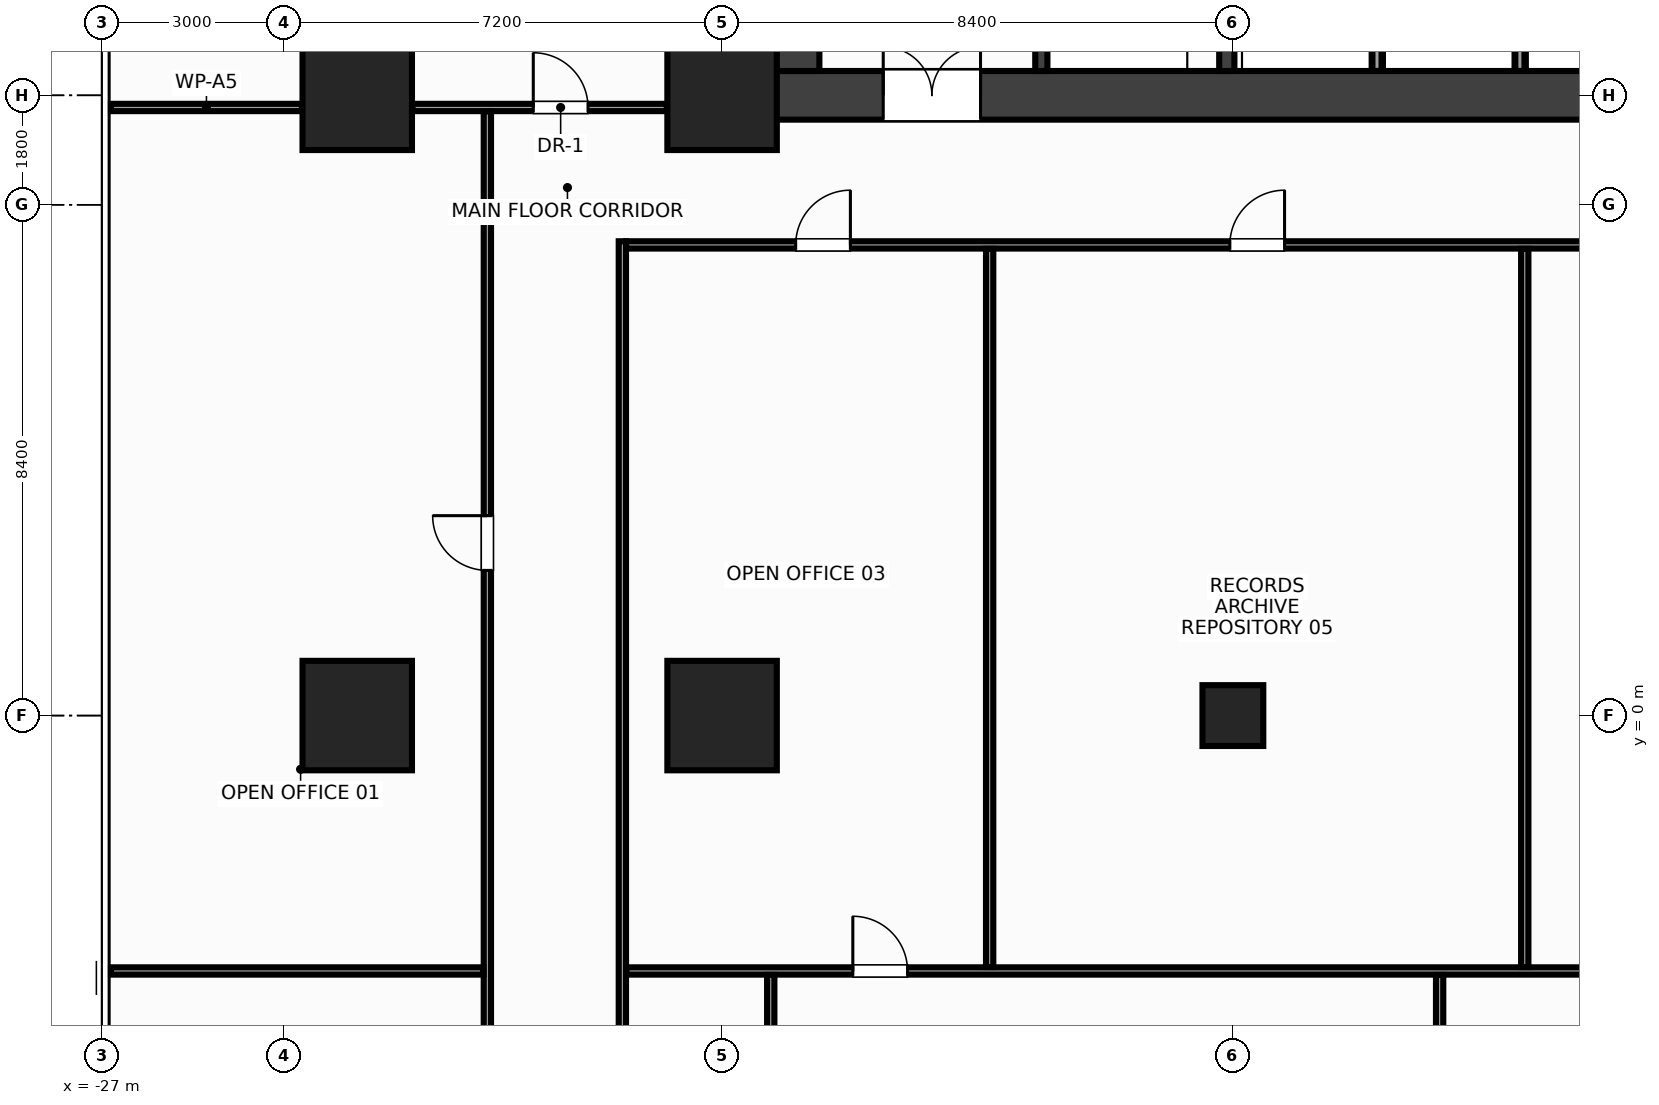
"""IFC4 building model, lengths in metres.
Left out: names, types, materials, properties, quantities, classifications, styles, units other than length and angle.
Written with IfcOpenShell. Run it as: python <this file> out.ifc"""

import sys

from ifc_helpers import new_model, si_unit, direction, frame, frame_2d, origin, origin_2d, place, context, subcontext, project, spatial, rectangle, hollow_rectangle, extrude, source, transform, mapped, element, fill, save


model = new_model("IFC4")
c1 = context("Model", 3, precision=1e-05, world=origin(), true_north=direction((0.0, 1.0)))
c2 = subcontext(c1, "Body", "Model", "MODEL_VIEW")
j1 = project(units=[si_unit("LENGTHUNIT", "METRE"), si_unit("PLANEANGLEUNIT", "RADIAN")], contexts=[c1])
p1 = place(None, origin())
s1 = spatial("IfcSite", under=j1, at=p1, CompositionType="ELEMENT")
p2 = place(p1, origin())
s2 = spatial("IfcBuilding", under=s1, at=p2, CompositionType="ELEMENT")
p3 = place(p2, frame((0.0, 0.0, 23.6)))
s3 = spatial("IfcBuildingStorey", under=s2, at=p3, CompositionType="ELEMENT", Elevation=23.6)
m1 = source(origin(), c2, "Body", "SweptSolid", [
    extrude(rectangle(XDim=32.0, YDim=0.8, at=frame_2d((16.0, 0.0))), origin(), (0.0, 0.0, 1.0), 3.6),
])
p4 = place(p3, frame((-16.0, 10.2, 0.0), z_axis=(0.0, 0.0, 1.0), x_axis=(1.0, 0.0, 0.0)))
e1 = element("IfcWall", 1, at=p4, inside=s3, PredefinedType="SHEAR", context=c2, shape_type="MappedRepresentation", body=[
    mapped(m1, transform((0.0, 0.0, 0.0), x_axis=(1.0, 0.0, 0.0), y_axis=(0.0, 1.0, 0.0), z_axis=(0.0, 0.0, 1.0), scale=1.0)),
])
p5 = place(p4, frame((1.85, 0.0, 0.0)))
e2 = element("IfcOpeningElement", 2, at=p5, cuts=e1, PredefinedType="OPENING", context=c2, shape_type="SweptSolid", body=[
    extrude(rectangle(XDim=1.6, YDim=2.15, at=frame_2d((0.8, 1.075))), frame((0.0, 0.412, 0.0), z_axis=(0.0, -1.0, 0.0), x_axis=(1.0, 0.0, 0.0)), (0.0, 0.0, 1.0), 0.824),
])
p6 = place(p4, frame((28.55, 0.0, 0.0)))
e3 = element("IfcOpeningElement", 3, at=p6, cuts=e1, PredefinedType="OPENING", context=c2, shape_type="SweptSolid", body=[
    extrude(rectangle(XDim=1.6, YDim=2.15, at=frame_2d((0.8, 1.075))), frame((0.0, 0.412, 0.0), z_axis=(0.0, -1.0, 0.0), x_axis=(1.0, 0.0, 0.0)), (0.0, 0.0, 1.0), 0.824),
])
p7 = place(p4, frame((15.25, 0.0, 0.0)))
e4 = element("IfcOpeningElement", 4, at=p7, cuts=e1, PredefinedType="OPENING", context=c2, shape_type="SweptSolid", body=[
    extrude(rectangle(XDim=1.5, YDim=2.2, at=frame_2d((0.75, 1.1))), frame((0.0, 0.412, 0.0), z_axis=(0.0, -1.0, 0.0), x_axis=(1.0, 0.0, 0.0)), (0.0, 0.0, 1.0), 0.824),
])
m2 = source(origin(), c2, "Body", "SweptSolid", [
    extrude(rectangle(XDim=12.8, YDim=0.8, at=frame_2d((6.4, 0.0))), origin(), (0.0, 0.0, 1.0), 3.6),
])
p8 = place(p3, frame((-15.6, 10.6, 0.0), z_axis=(0.0, 0.0, 1.0), x_axis=(0.0, 1.0, 0.0)))
e5 = element("IfcWall", 5, at=p8, inside=s3, PredefinedType="SHEAR", context=c2, shape_type="MappedRepresentation", body=[
    mapped(m2, transform((0.0, 0.0, 0.0), x_axis=(1.0, 0.0, 0.0), y_axis=(0.0, 1.0, 0.0), z_axis=(0.0, 0.0, 1.0), scale=1.0)),
])
m3 = source(origin(), c2, "Body", "SweptSolid", [
    extrude(rectangle(XDim=12.8, YDim=0.25, at=frame_2d((6.4, 0.0))), origin(), (0.0, 0.0, 1.0), 3.6),
])
p9 = place(p3, frame((-8.5, 10.6, 0.0), z_axis=(0.0, 0.0, 1.0), x_axis=(0.0, 1.0, 0.0)))
e6 = element("IfcWall", 6, at=p9, inside=s3, PredefinedType="SHEAR", context=c2, shape_type="MappedRepresentation", body=[
    mapped(m3, transform((0.0, 0.0, 0.0), x_axis=(1.0, 0.0, 0.0), y_axis=(0.0, 1.0, 0.0), z_axis=(0.0, 0.0, 1.0), scale=1.0)),
])
p10 = place(p9, frame((5.9, 0.0, 0.0)))
e7 = element("IfcOpeningElement", 7, at=p10, cuts=e6, PredefinedType="OPENING", context=c2, shape_type="SweptSolid", body=[
    extrude(rectangle(XDim=0.95, YDim=2.15, at=frame_2d((0.475, 1.075))), frame((0.0, 0.137, 0.0), z_axis=(0.0, -1.0, 0.0), x_axis=(1.0, 0.0, 0.0)), (0.0, 0.0, 1.0), 0.274),
])
m4 = source(origin(), c2, "Body", "SweptSolid", [
    extrude(rectangle(XDim=3.05, YDim=0.2, at=frame_2d((1.525, 0.0))), origin(), (0.0, 0.0, 1.0), 3.6),
])
p11 = place(p3, frame((-11.55, 10.6, 0.0), z_axis=(0.0, 0.0, 1.0), x_axis=(0.0, 1.0, 0.0)))
e8 = element("IfcWall", 8, at=p11, inside=s3, PredefinedType="SHEAR", context=c2, shape_type="MappedRepresentation", body=[
    mapped(m4, transform((0.0, 0.0, 0.0), x_axis=(1.0, 0.0, 0.0), y_axis=(0.0, 1.0, 0.0), z_axis=(0.0, 0.0, 1.0), scale=1.0)),
])
p12 = place(p11, frame((0.9, 0.0, 0.0)))
e9 = element("IfcOpeningElement", 9, at=p12, cuts=e8, PredefinedType="OPENING", context=c2, shape_type="SweptSolid", body=[
    extrude(rectangle(XDim=1.1, YDim=2.15, at=frame_2d((0.55, 1.075))), frame((0.0, 0.112, 0.0), z_axis=(0.0, -1.0, 0.0), x_axis=(1.0, 0.0, 0.0)), (0.0, 0.0, 1.0), 0.224),
])
m5 = source(origin(), c2, "Body", "SweptSolid", [
    extrude(rectangle(XDim=1.8, YDim=1.8, at=origin_2d()), origin(), (0.0, 0.0, 1.0), 3.6),
])
for number, where, z_axis, x_axis in (
    (10, (-16.8, 0.0, 0.0), (0.0, 0.0, 1.0), (1.0, 0.0, 0.0)),
    (11, (-16.8, 10.2, 0.0), (0.0, 0.0, 1.0), (1.0, 0.0, 0.0)),
    (12, (-22.8, 0.0, 0.0), (0.0, 0.0, 1.0), (1.0, 0.0, 0.0)),
    (13, (-22.8, 10.2, 0.0), (0.0, 0.0, 1.0), (1.0, 0.0, 0.0)),
):
    element("IfcColumn", number, at=place(p3, frame(where, z_axis=z_axis, x_axis=x_axis)), inside=s3, PredefinedType="COLUMN", context=c2, shape_type="MappedRepresentation", body=[
        mapped(m5, transform((0.0, 0.0, 0.0), x_axis=(1.0, 0.0, 0.0), y_axis=(0.0, 1.0, 0.0), z_axis=(0.0, 0.0, 1.0), scale=1.0)),
    ])
m6 = source(origin(), c2, "Body", "SweptSolid", [
    extrude(hollow_rectangle(XDim=1.0, YDim=1.0, WallThickness=0.045, at=origin_2d()), origin(), (0.0, 0.0, 1.0), 3.6),
])
p13 = place(p3, frame((-8.4, 0.0, 0.0), z_axis=(0.0, 0.0, 1.0), x_axis=(1.0, 0.0, 0.0)))
e14 = element("IfcColumn", 14, at=p13, inside=s3, PredefinedType="COLUMN", context=c2, shape_type="MappedRepresentation", body=[
    mapped(m6, transform((0.0, 0.0, 0.0), x_axis=(1.0, 0.0, 0.0), y_axis=(0.0, 1.0, 0.0), z_axis=(0.0, 0.0, 1.0), scale=1.0)),
])
m7 = source(origin(), c2, "Body", "SweptSolid", [
    extrude(rectangle(XDim=3.34, YDim=0.15, at=frame_2d((1.67, 0.0))), origin(), (0.0, 0.0, 1.0), 3.36),
])
for number, where, z_axis, x_axis in (
    (15, (-6.03, 10.6, 0.0), (0.0, 0.0, 1.0), (0.0, 1.0, 0.0)),
    (16, (-3.68, 10.6, 0.0), (0.0, 0.0, 1.0), (0.0, 1.0, 0.0)),
):
    element("IfcWall", number, at=place(p3, frame(where, z_axis=z_axis, x_axis=x_axis)), inside=s3, PredefinedType="PARTITIONING", context=c2, shape_type="MappedRepresentation", body=[
        mapped(m7, transform((0.0, 0.0, 0.0), x_axis=(1.0, 0.0, 0.0), y_axis=(0.0, 1.0, 0.0), z_axis=(0.0, 0.0, 1.0), scale=1.0)),
    ])
m8 = source(origin(), c2, "Body", "SweptSolid", [
    extrude(rectangle(XDim=3.14, YDim=0.12, at=frame_2d((1.57, 0.0))), origin(), (0.0, 0.0, 1.0), 2.435),
])
p14 = place(p3, frame((-26.85, 10.0, 0.0), z_axis=(0.0, 0.0, 1.0), x_axis=(1.0, 0.0, 0.0)))
e17 = element("IfcWall", 17, at=p14, inside=s3, PredefinedType="PARTITIONING", context=c2, shape_type="MappedRepresentation", body=[
    mapped(m8, transform((0.0, 0.0, 0.0), x_axis=(1.0, 0.0, 0.0), y_axis=(0.0, 1.0, 0.0), z_axis=(0.0, 0.0, 1.0), scale=1.0)),
])
m9 = source(origin(), c2, "Body", "SweptSolid", [
    extrude(rectangle(XDim=4.18, YDim=0.12, at=frame_2d((2.09, 0.0))), origin(), (0.0, 0.0, 1.0), 2.745),
])
p15 = place(p3, frame((-21.89, 10.0, 0.0), z_axis=(0.0, 0.0, 1.0), x_axis=(1.0, 0.0, 0.0)))
e18 = element("IfcWall", 18, at=p15, inside=s3, PredefinedType="PARTITIONING", context=c2, shape_type="MappedRepresentation", body=[
    mapped(m9, transform((0.0, 0.0, 0.0), x_axis=(1.0, 0.0, 0.0), y_axis=(0.0, 1.0, 0.0), z_axis=(0.0, 0.0, 1.0), scale=1.0)),
])
p16 = place(p15, frame((1.985, 0.0, 0.0)))
e19 = element("IfcOpeningElement", 19, at=p16, cuts=e18, PredefinedType="OPENING", context=c2, shape_type="SweptSolid", body=[
    extrude(rectangle(XDim=0.9, YDim=2.15, at=frame_2d((0.45, 1.075))), frame((0.0, 0.072, 0.0), z_axis=(0.0, -1.0, 0.0), x_axis=(1.0, 0.0, 0.0)), (0.0, 0.0, 1.0), 0.144),
])
m10 = source(origin(), c2, "Body", "SweptSolid", [
    extrude(rectangle(XDim=36.76, YDim=0.12, at=frame_2d((18.38, 0.0))), origin(), (0.0, 0.0, 1.0), 2.745),
])
p17 = place(p3, frame((-18.38, 7.74, 0.0), z_axis=(0.0, 0.0, 1.0), x_axis=(1.0, 0.0, 0.0)))
e20 = element("IfcWall", 20, at=p17, inside=s3, PredefinedType="PARTITIONING", context=c2, shape_type="MappedRepresentation", body=[
    mapped(m10, transform((0.0, 0.0, 0.0), x_axis=(1.0, 0.0, 0.0), y_axis=(0.0, 1.0, 0.0), z_axis=(0.0, 0.0, 1.0), scale=1.0)),
])
p18 = place(p17, frame((2.79, 0.0, 0.0)))
e21 = element("IfcOpeningElement", 21, at=p18, cuts=e20, PredefinedType="OPENING", context=c2, shape_type="SweptSolid", body=[
    extrude(rectangle(XDim=0.9, YDim=2.15, at=frame_2d((0.45, 1.075))), frame((0.0, 0.072, 0.0), z_axis=(0.0, -1.0, 0.0), x_axis=(1.0, 0.0, 0.0)), (0.0, 0.0, 1.0), 0.144),
])
p19 = place(p17, frame((32.99, 0.0, 0.0)))
e22 = element("IfcOpeningElement", 22, at=p19, cuts=e20, PredefinedType="OPENING", context=c2, shape_type="SweptSolid", body=[
    extrude(rectangle(XDim=0.9, YDim=2.15, at=frame_2d((0.45, 1.075))), frame((0.0, 0.072, 0.0), z_axis=(0.0, -1.0, 0.0), x_axis=(1.0, 0.0, 0.0)), (0.0, 0.0, 1.0), 0.144),
])
p20 = place(p17, frame((9.93, 0.0, 0.0)))
e23 = element("IfcOpeningElement", 23, at=p20, cuts=e20, PredefinedType="OPENING", context=c2, shape_type="SweptSolid", body=[
    extrude(rectangle(XDim=0.9, YDim=2.15, at=frame_2d((0.45, 1.075))), frame((0.0, 0.072, 0.0), z_axis=(0.0, -1.0, 0.0), x_axis=(1.0, 0.0, 0.0)), (0.0, 0.0, 1.0), 0.144),
])
p21 = place(p17, frame((18.23, 0.0, 0.0)))
e24 = element("IfcOpeningElement", 24, at=p21, cuts=e20, PredefinedType="OPENING", context=c2, shape_type="SweptSolid", body=[
    extrude(rectangle(XDim=0.9, YDim=2.15, at=frame_2d((0.45, 1.075))), frame((0.0, 0.072, 0.0), z_axis=(0.0, -1.0, 0.0), x_axis=(1.0, 0.0, 0.0)), (0.0, 0.0, 1.0), 0.144),
])
p22 = place(p17, frame((27.03, 0.0, 0.0)))
e25 = element("IfcOpeningElement", 25, at=p22, cuts=e20, PredefinedType="OPENING", context=c2, shape_type="SweptSolid", body=[
    extrude(rectangle(XDim=0.9, YDim=2.15, at=frame_2d((0.45, 1.075))), frame((0.0, 0.072, 0.0), z_axis=(0.0, -1.0, 0.0), x_axis=(1.0, 0.0, 0.0)), (0.0, 0.0, 1.0), 0.144),
])
m11 = source(origin(), c2, "Body", "SweptSolid", [
    extrude(rectangle(XDim=24.13, YDim=0.12, at=frame_2d((12.065, 0.0))), origin(), (0.0, 0.0, 1.0), 2.745),
])
p23 = place(p3, frame((-20.66, -14.195, 0.0), z_axis=(0.0, 0.0, 1.0), x_axis=(0.0, 1.0, 0.0)))
e26 = element("IfcWall", 26, at=p23, inside=s3, PredefinedType="PARTITIONING", context=c2, shape_type="MappedRepresentation", body=[
    mapped(m11, transform((0.0, 0.0, 0.0), x_axis=(1.0, 0.0, 0.0), y_axis=(0.0, 1.0, 0.0), z_axis=(0.0, 0.0, 1.0), scale=1.0)),
])
p24 = place(p23, frame((16.583, 0.0, 0.0)))
e27 = element("IfcOpeningElement", 27, at=p24, cuts=e26, PredefinedType="OPENING", context=c2, shape_type="SweptSolid", body=[
    extrude(rectangle(XDim=0.9, YDim=2.15, at=frame_2d((0.45, 1.075))), frame((0.0, 0.072, 0.0), z_axis=(0.0, -1.0, 0.0), x_axis=(1.0, 0.0, 0.0)), (0.0, 0.0, 1.0), 0.144),
])
m12 = source(origin(), c2, "Body", "SweptSolid", [
    extrude(rectangle(XDim=21.995, YDim=0.12, at=frame_2d((10.998, 0.0))), origin(), (0.0, 0.0, 1.0), 2.745),
])
p25 = place(p3, frame((-18.44, -14.195, 0.0), z_axis=(0.0, 0.0, 1.0), x_axis=(0.0, 1.0, 0.0)))
e28 = element("IfcWall", 28, at=p25, inside=s3, PredefinedType="PARTITIONING", context=c2, shape_type="MappedRepresentation", body=[
    mapped(m12, transform((0.0, 0.0, 0.0), x_axis=(1.0, 0.0, 0.0), y_axis=(0.0, 1.0, 0.0), z_axis=(0.0, 0.0, 1.0), scale=1.0)),
])
m13 = source(origin(), c2, "Body", "SweptSolid", [
    extrude(rectangle(XDim=6.125, YDim=0.12, at=frame_2d((3.062, 0.0))), origin(), (0.0, 0.0, 1.0), 2.745),
])
p26 = place(p3, frame((-26.85, -4.2, 0.0), z_axis=(0.0, 0.0, 1.0), x_axis=(1.0, 0.0, 0.0)))
e29 = element("IfcWall", 29, at=p26, inside=s3, PredefinedType="PARTITIONING", context=c2, shape_type="MappedRepresentation", body=[
    mapped(m13, transform((0.0, 0.0, 0.0), x_axis=(1.0, 0.0, 0.0), y_axis=(0.0, 1.0, 0.0), z_axis=(0.0, 0.0, 1.0), scale=1.0)),
])
m14 = source(origin(), c2, "Body", "SweptSolid", [
    extrude(rectangle(XDim=36.75, YDim=0.12, at=frame_2d((18.375, 0.0))), origin(), (0.0, 0.0, 1.0), 2.745),
])
p27 = place(p3, frame((-18.375, -4.2, 0.0), z_axis=(0.0, 0.0, 1.0), x_axis=(1.0, 0.0, 0.0)))
e30 = element("IfcWall", 30, at=p27, inside=s3, PredefinedType="PARTITIONING", context=c2, shape_type="MappedRepresentation", body=[
    mapped(m14, transform((0.0, 0.0, 0.0), x_axis=(1.0, 0.0, 0.0), y_axis=(0.0, 1.0, 0.0), z_axis=(0.0, 0.0, 1.0), scale=1.0)),
])
p28 = place(p27, frame((3.725, 0.0, 0.0)))
e31 = element("IfcOpeningElement", 31, at=p28, cuts=e30, PredefinedType="OPENING", context=c2, shape_type="SweptSolid", body=[
    extrude(rectangle(XDim=0.9, YDim=2.15, at=frame_2d((0.45, 1.075))), frame((0.0, 0.072, 0.0), z_axis=(0.0, -1.0, 0.0), x_axis=(1.0, 0.0, 0.0)), (0.0, 0.0, 1.0), 0.144),
])
p29 = place(p27, frame((18.225, 0.0, 0.0)))
e32 = element("IfcOpeningElement", 32, at=p29, cuts=e30, PredefinedType="OPENING", context=c2, shape_type="SweptSolid", body=[
    extrude(rectangle(XDim=0.9, YDim=2.15, at=frame_2d((0.45, 1.075))), frame((0.0, 0.072, 0.0), z_axis=(0.0, -1.0, 0.0), x_axis=(1.0, 0.0, 0.0)), (0.0, 0.0, 1.0), 0.144),
])
p30 = place(p27, frame((32.925, 0.0, 0.0)))
e33 = element("IfcOpeningElement", 33, at=p30, cuts=e30, PredefinedType="OPENING", context=c2, shape_type="SweptSolid", body=[
    extrude(rectangle(XDim=0.9, YDim=2.15, at=frame_2d((0.45, 1.075))), frame((0.0, 0.072, 0.0), z_axis=(0.0, -1.0, 0.0), x_axis=(1.0, 0.0, 0.0)), (0.0, 0.0, 1.0), 0.144),
])
m15 = source(origin(), c2, "Body", "SweptSolid", [
    extrude(rectangle(XDim=11.81, YDim=0.12, at=frame_2d((5.905, 0.0))), origin(), (0.0, 0.0, 1.0), 2.301),
])
for number, where, z_axis, x_axis in (
    (34, (-12.4, -4.135, 0.0), (0.0, 0.0, 1.0), (0.0, 1.0, 0.0)),
    (35, (-3.6, -4.135, 0.0), (0.0, 0.0, 1.0), (0.0, 1.0, 0.0)),
):
    element("IfcWall", number, at=place(p3, frame(where, z_axis=z_axis, x_axis=x_axis)), inside=s3, PredefinedType="PARTITIONING", context=c2, shape_type="MappedRepresentation", body=[
        mapped(m15, transform((0.0, 0.0, 0.0), x_axis=(1.0, 0.0, 0.0), y_axis=(0.0, 1.0, 0.0), z_axis=(0.0, 0.0, 1.0), scale=1.0)),
    ])
m16 = source(origin(), c2, "Body", "SweptSolid", [
    extrude(rectangle(XDim=5.625, YDim=0.12, at=frame_2d((2.812, 0.0))), origin(), (0.0, 0.0, 1.0), 3.36),
])
p31 = place(p3, frame((-16.0, -9.89, 0.0), z_axis=(0.0, 0.0, 1.0), x_axis=(0.0, 1.0, 0.0)))
e36 = element("IfcWall", 36, at=p31, inside=s3, PredefinedType="PARTITIONING", context=c2, shape_type="MappedRepresentation", body=[
    mapped(m16, transform((0.0, 0.0, 0.0), x_axis=(1.0, 0.0, 0.0), y_axis=(0.0, 1.0, 0.0), z_axis=(0.0, 0.0, 1.0), scale=1.0)),
])
m17 = source(origin(), c2, "Body", "SweptSolid", [
    extrude(rectangle(XDim=22.585, YDim=0.12, at=frame_2d((11.292, 0.0))), origin(), (0.0, 0.0, 1.0), 2.745),
])
p32 = place(p3, frame((-5.0, -26.85, 0.0), z_axis=(0.0, 0.0, 1.0), x_axis=(0.0, 1.0, 0.0)))
e37 = element("IfcWall", 37, at=p32, inside=s3, PredefinedType="PARTITIONING", context=c2, shape_type="MappedRepresentation", body=[
    mapped(m17, transform((0.0, 0.0, 0.0), x_axis=(1.0, 0.0, 0.0), y_axis=(0.0, 1.0, 0.0), z_axis=(0.0, 0.0, 1.0), scale=1.0)),
])
m18 = source(origin(), c2, "Body", "SweptSolid", [
    extrude(rectangle(XDim=1.6, YDim=2.15, at=frame_2d((0.8, 1.075))), frame((0.0, 0.025, 0.0), z_axis=(0.0, -1.0, 0.0), x_axis=(1.0, 0.0, 0.0)), (0.0, 0.0, 1.0), 0.05),
])
p33 = place(p5, origin())
e38 = element("IfcDoor", 38, at=p33, inside=s3, OperationType="DOUBLE_DOOR_SINGLE_SWING", PredefinedType="DOOR", context=c2, shape_type="MappedRepresentation", body=[
    mapped(m18, transform((0.0, 0.0, 0.0), x_axis=(1.0, 0.0, 0.0), y_axis=(0.0, 1.0, 0.0), z_axis=(0.0, 0.0, 1.0), scale=1.0)),
])
fill(e2, e38)
m19 = source(origin(), c2, "Body", "SweptSolid", [
    extrude(rectangle(XDim=0.9, YDim=2.15, at=frame_2d((0.45, 1.075))), frame((0.0, 0.025, 0.0), z_axis=(0.0, -1.0, 0.0), x_axis=(1.0, 0.0, 0.0)), (0.0, 0.0, 1.0), 0.05),
])
p34 = place(p16, origin())
e39 = element("IfcDoor", 39, at=p34, inside=s3, OperationType="SINGLE_SWING_LEFT", PredefinedType="DOOR", context=c2, shape_type="MappedRepresentation", body=[
    mapped(m19, transform((0.0, 0.0, 0.0), x_axis=(1.0, 0.0, 0.0), y_axis=(0.0, 1.0, 0.0), z_axis=(0.0, 0.0, 1.0), scale=1.0)),
])
fill(e19, e39)
p35 = place(p24, origin())
e40 = element("IfcDoor", 40, at=p35, inside=s3, OperationType="SINGLE_SWING_RIGHT", PredefinedType="DOOR", context=c2, shape_type="MappedRepresentation", body=[
    mapped(m19, transform((0.0, 0.0, 0.0), x_axis=(1.0, 0.0, 0.0), y_axis=(0.0, 1.0, 0.0), z_axis=(0.0, 0.0, 1.0), scale=1.0)),
])
fill(e27, e40)
p36 = place(p18, origin())
e41 = element("IfcDoor", 41, at=p36, inside=s3, OperationType="SINGLE_SWING_RIGHT", PredefinedType="DOOR", context=c2, shape_type="MappedRepresentation", body=[
    mapped(m19, transform((0.0, 0.0, 0.0), x_axis=(1.0, 0.0, 0.0), y_axis=(0.0, 1.0, 0.0), z_axis=(0.0, 0.0, 1.0), scale=1.0)),
])
fill(e21, e41)
p37 = place(p20, origin())
e42 = element("IfcDoor", 42, at=p37, inside=s3, OperationType="SINGLE_SWING_RIGHT", PredefinedType="DOOR", context=c2, shape_type="MappedRepresentation", body=[
    mapped(m19, transform((0.0, 0.0, 0.0), x_axis=(1.0, 0.0, 0.0), y_axis=(0.0, 1.0, 0.0), z_axis=(0.0, 0.0, 1.0), scale=1.0)),
])
fill(e23, e42)
p38 = place(p28, origin())
e43 = element("IfcDoor", 43, at=p38, inside=s3, OperationType="SINGLE_SWING_LEFT", PredefinedType="DOOR", context=c2, shape_type="MappedRepresentation", body=[
    mapped(m19, transform((0.0, 0.0, 0.0), x_axis=(1.0, 0.0, 0.0), y_axis=(0.0, 1.0, 0.0), z_axis=(0.0, 0.0, 1.0), scale=1.0)),
])
fill(e31, e43)
save(model, sys.argv[1])
